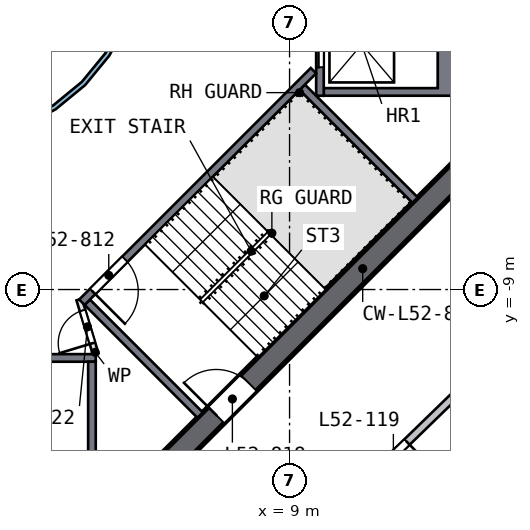
"""IFC4 building model, lengths in metres.
Left out: names, types, materials, properties, quantities, classifications, styles, units other than length and angle.
Written with IfcOpenShell. Run it as: python <this file> out.ifc"""

import sys

from ifc_helpers import new_model, si_unit, direction, frame, frame_2d, origin, place, context, subcontext, project, spatial, polyline, rectangle, outline, extrude, element, fill, save


model = new_model("IFC4")
c1 = context("Model", 3, precision=1e-05, world=origin(), true_north=direction((0.0, 1.0)))
c2 = subcontext(c1, "Body", "Model", "MODEL_VIEW")
j1 = project(units=[si_unit("LENGTHUNIT", "METRE"), si_unit("PLANEANGLEUNIT", "RADIAN")], contexts=[c1])
p1 = place(None, origin())
s1 = spatial("IfcSite", under=j1, at=p1, CompositionType="ELEMENT")
p2 = place(p1, origin())
s2 = spatial("IfcBuilding", under=s1, at=p2, CompositionType="ELEMENT")
p3 = place(p2, frame((0.0, 0.0, 212.5)))
s3 = spatial("IfcBuildingStorey", under=s2, at=p3, CompositionType="ELEMENT", Elevation=212.5)
p4 = place(p3, frame((5.587, -13.788, 0.0), z_axis=(0.0, 0.0, 1.0), x_axis=(0.707106781, 0.707106781, 0.0)))
e1 = element("IfcWall", 1, at=p4, inside=s3, PredefinedType="SHEAR", context=c2, shape_type="SweptSolid", body=[
    extrude(rectangle(XDim=11.598, YDim=0.6, at=frame_2d((5.799, 0.0))), origin(), (0.0, 0.0, 1.0), 3.5),
])
p5 = place(p4, frame((2.099, 0.0, 0.0)))
e2 = element("IfcOpeningElement", 2, at=p5, cuts=e1, PredefinedType="OPENING", context=c2, shape_type="SweptSolid", body=[
    extrude(rectangle(XDim=1.2, YDim=2.1, at=frame_2d((0.6, 1.05))), frame((0.0, 0.31, 0.0), z_axis=(0.0, -1.0, 0.0), x_axis=(1.0, 0.0, 0.0)), (0.0, 0.0, 1.0), 0.62),
])
p6 = place(p3, origin())
e3 = element("IfcWall", 3, at=p6, inside=s3, PredefinedType="SOLIDWALL", context=c2, shape_type="SweptSolid", body=[
    extrude(outline(polyline([(13.4, -3.9), (9.9, -3.9), (9.9, -3.7), (12.9, -3.7), (12.9, -1.4), (9.9, -1.4), (9.9, -1.2), (13.4, -1.2), (13.4, -3.9)])), origin(), (0.0, 0.0, 1.0), 3.0),
])
p7 = place(p3, frame((9.8, -1.2, 0.0), z_axis=(0.0, 0.0, 1.0), x_axis=(0.0, -1.0, 0.0)))
e4 = element("IfcWall", 4, at=p7, inside=s3, PredefinedType="SOLIDWALL", context=c2, shape_type="SweptSolid", body=[
    extrude(rectangle(XDim=2.7, YDim=0.2, at=frame_2d((1.35, 0.0))), origin(), (0.0, 0.0, 1.0), 3.0),
])
p8 = place(p7, frame((0.75, 0.0, 0.0)))
e5 = element("IfcOpeningElement", 5, at=p8, cuts=e4, PredefinedType="OPENING", context=c2, shape_type="SweptSolid", body=[
    extrude(rectangle(XDim=1.2, YDim=2.1, at=frame_2d((0.6, 1.05))), frame((0.0, 0.11, 0.0), z_axis=(0.0, -1.0, 0.0), x_axis=(1.0, 0.0, 0.0)), (0.0, 0.0, 1.0), 0.22),
])
p9 = place(p3, frame((-3.9, -10.8, 0.0), z_axis=(0.0, 0.0, 1.0), x_axis=(1.0, 0.0, 0.0)))
e6 = element("IfcWall", 6, at=p9, inside=s3, PredefinedType="SOLIDWALL", context=c2, shape_type="SweptSolid", body=[
    extrude(rectangle(XDim=7.8, YDim=0.2, at=frame_2d((3.9, 0.0))), origin(), (0.0, 0.0, 1.0), 3.0),
])
p10 = place(p9, frame((3.45, 0.0, 0.0)))
e7 = element("IfcOpeningElement", 7, at=p10, cuts=e6, PredefinedType="OPENING", context=c2, shape_type="SweptSolid", body=[
    extrude(rectangle(XDim=0.9, YDim=2.1, at=frame_2d((0.45, 1.05))), frame((0.0, 0.11, 0.0), z_axis=(0.0, -1.0, 0.0), x_axis=(1.0, 0.0, 0.0)), (0.0, 0.0, 1.0), 0.22),
])
p11 = place(p3, frame((3.8, -10.9, 0.0), z_axis=(0.0, 0.0, 1.0), x_axis=(0.0, -1.0, 0.0)))
e8 = element("IfcWall", 8, at=p11, inside=s3, PredefinedType="SOLIDWALL", context=c2, shape_type="SweptSolid", body=[
    extrude(rectangle(XDim=2.5, YDim=0.2, at=frame_2d((1.25, 0.0))), origin(), (0.0, 0.0, 1.0), 3.0),
])
p12 = place(p3, frame((9.629, -3.24, 0.0), z_axis=(0.0, 0.0, 1.0), x_axis=(-0.707120946, -0.707092617, 0.0)))
e9 = element("IfcWall", 9, at=p12, inside=s3, PredefinedType="SOLIDWALL", context=c2, shape_type="SweptSolid", body=[
    extrude(rectangle(XDim=8.618, YDim=0.2, at=frame_2d((4.309, 0.0))), origin(), (0.0, 0.0, 1.0), 3.0),
])
p13 = place(p12, frame((7.018, 0.0, 0.0)))
e10 = element("IfcOpeningElement", 10, at=p13, cuts=e9, PredefinedType="OPENING", context=c2, shape_type="SweptSolid", body=[
    extrude(rectangle(XDim=1.2, YDim=2.1, at=frame_2d((0.6, 1.05))), frame((0.0, 0.11, 0.0), z_axis=(0.0, -1.0, 0.0), x_axis=(1.0, 0.0, 0.0)), (0.0, 0.0, 1.0), 0.22),
])
for number, where, z_axis, x_axis in (
    (11, (3.677, -9.334, 0.0), (0.0, 0.0, 1.0), (0.707, -0.707, 0.0)),
    (12, (9.334, -3.677, 0.0), (0.0, 0.0, 1.0), (0.707, -0.707, 0.0)),
):
    element("IfcWall", number, at=place(p3, frame(where, z_axis=z_axis, x_axis=x_axis)), inside=s3, PredefinedType="SOLIDWALL", context=c2, shape_type="SweptSolid", body=[
        extrude(rectangle(XDim=4.2, YDim=0.2, at=frame_2d((2.1, 0.0))), origin(), (0.0, 0.0, 1.0), 3.0),
    ])
p14 = place(p3, frame((3.9, -10.7, 0.0), z_axis=(0.0, 0.0, 1.0), x_axis=(-0.289808785, 0.957084567, 0.0)))
e13 = element("IfcWall", 13, at=p14, inside=s3, PredefinedType="PARTITIONING", context=c2, shape_type="SweptSolid", body=[
    extrude(rectangle(XDim=1.501, YDim=0.15, at=frame_2d((0.75, 0.0))), origin(), (0.0, 0.0, 1.0), 3.0),
])
p15 = place(p14, frame((0.301, 0.0, 0.0)))
e14 = element("IfcOpeningElement", 14, at=p15, cuts=e13, PredefinedType="OPENING", context=c2, shape_type="SweptSolid", body=[
    extrude(rectangle(XDim=0.9, YDim=2.1, at=frame_2d((0.45, 1.05))), frame((0.0, 0.085, 0.0), z_axis=(0.0, -1.0, 0.0), x_axis=(1.0, 0.0, 0.0)), (0.0, 0.0, 1.0), 0.17),
])
p16 = place(p3, origin())
e15 = element("IfcWall", 15, at=p16, inside=s3, PredefinedType="SOLIDWALL", context=c2, shape_type="SweptSolid", body=[
    extrude(outline(polyline([(5.021, -0.999), (4.73, -1.959), (4.257, -2.844), (3.62, -3.62), (2.844, -4.257), (1.959, -4.73), (0.999, -5.021), (0.0, -5.12), (-0.999, -5.021), (-1.959, -4.73), (-2.844, -4.257), (-3.62, -3.62), (-4.257, -2.844), (-4.73, -1.959), (-5.021, -0.999), (-5.12, 0.0), (-5.021, 0.999), (-4.73, 1.959), (-4.257, 2.844), (-3.62, 3.62), (-2.844, 4.257), (-1.959, 4.73), (-0.999, 5.021), (0.0, 5.12), (0.999, 5.021), (1.959, 4.73), (2.844, 4.257), (3.62, 3.62), (4.257, 2.844), (4.73, 1.959), (5.021, 0.999), (5.12, 0.0), (5.021, -0.999)]), holes=[polyline([(4.904, 0.976), (4.619, 1.913), (4.157, 2.778), (3.535, 3.535), (2.778, 4.157), (1.913, 4.619), (0.976, 4.904), (0.0, 5.0), (-0.976, 4.904), (-1.913, 4.619), (-2.778, 4.157), (-3.535, 3.535), (-4.157, 2.778), (-4.619, 1.913), (-4.904, 0.976), (-5.0, 0.0), (-4.904, -0.976), (-4.619, -1.913), (-4.157, -2.778), (-3.535, -3.535), (-2.778, -4.157), (-1.913, -4.619), (-0.976, -4.904), (0.0, -5.0), (0.976, -4.904), (1.913, -4.619), (2.778, -4.157), (3.535, -3.535), (4.157, -2.778), (4.619, -1.913), (4.904, -0.976), (5.0, 0.0), (4.904, 0.976)])]), origin(), (0.0, 0.0, 1.0), 3.0),
])
p17 = place(p3, frame((15.785, -9.425, 0.0), z_axis=(0.0, 0.0, 1.0), x_axis=(-0.717395, -0.696666645, 0.0)))
e16 = element("IfcWall", 16, at=p17, inside=s3, PredefinedType="SOLIDWALL", context=c2, shape_type="SweptSolid", body=[
    extrude(rectangle(XDim=9.316, YDim=0.2, at=frame_2d((4.658, 0.0))), origin(), (0.0, 0.0, 1.0), 3.0),
])
p18 = place(p17, frame((5.15, 0.0, 0.0)))
e17 = element("IfcOpeningElement", 17, at=p18, cuts=e16, PredefinedType="OPENING", context=c2, shape_type="SweptSolid", body=[
    extrude(rectangle(XDim=1.0, YDim=2.1, at=frame_2d((0.5, 1.05))), frame((0.0, 0.11, 0.0), z_axis=(0.0, -1.0, 0.0), x_axis=(1.0, 0.0, 0.0)), (0.0, 0.0, 1.0), 0.22),
])
p19 = place(p8, origin())
e18 = element("IfcDoor", 18, at=p19, inside=s3, OperationType="DOUBLE_DOOR_SLIDING", PredefinedType="DOOR", context=c2, shape_type="SweptSolid", body=[
    extrude(rectangle(XDim=1.2, YDim=2.1, at=frame_2d((0.6, 1.05))), frame((0.0, 0.025, 0.0), z_axis=(0.0, -1.0, 0.0), x_axis=(1.0, 0.0, 0.0)), (0.0, 0.0, 1.0), 0.05),
])
fill(e5, e18)
p20 = place(p13, origin())
e19 = element("IfcDoor", 19, at=p20, inside=s3, OperationType="SINGLE_SWING_RIGHT", PredefinedType="DOOR", context=c2, shape_type="SweptSolid", body=[
    extrude(rectangle(XDim=1.2, YDim=2.1, at=frame_2d((0.6, 1.05))), frame((0.0, 0.025, 0.0), z_axis=(0.0, -1.0, 0.0), x_axis=(1.0, 0.0, 0.0)), (0.0, 0.0, 1.0), 0.05),
])
fill(e10, e19)
p21 = place(p5, origin())
e20 = element("IfcDoor", 20, at=p21, inside=s3, OperationType="SINGLE_SWING_LEFT", PredefinedType="DOOR", context=c2, shape_type="SweptSolid", body=[
    extrude(rectangle(XDim=1.2, YDim=2.1, at=frame_2d((0.6, 1.05))), frame((0.0, 0.025, 0.0), z_axis=(0.0, -1.0, 0.0), x_axis=(1.0, 0.0, 0.0)), (0.0, 0.0, 1.0), 0.05),
])
fill(e2, e20)
p22 = place(p15, origin())
e21 = element("IfcDoor", 21, at=p22, inside=s3, OperationType="SINGLE_SWING_LEFT", PredefinedType="DOOR", context=c2, shape_type="SweptSolid", body=[
    extrude(rectangle(XDim=0.9, YDim=2.1, at=frame_2d((0.45, 1.05))), frame((0.0, 0.025, 0.0), z_axis=(0.0, -1.0, 0.0), x_axis=(1.0, 0.0, 0.0)), (0.0, 0.0, 1.0), 0.05),
])
fill(e14, e21)
p23 = place(p18, origin())
e22 = element("IfcDoor", 22, at=p23, inside=s3, OperationType="SINGLE_SWING_LEFT", PredefinedType="DOOR", context=c2, shape_type="SweptSolid", body=[
    extrude(rectangle(XDim=1.0, YDim=2.1, at=frame_2d((0.5, 1.05))), frame((0.0, 0.025, 0.0), z_axis=(0.0, -1.0, 0.0), x_axis=(1.0, 0.0, 0.0)), (0.0, 0.0, 1.0), 0.05),
])
fill(e17, e22)
save(model, sys.argv[1])
